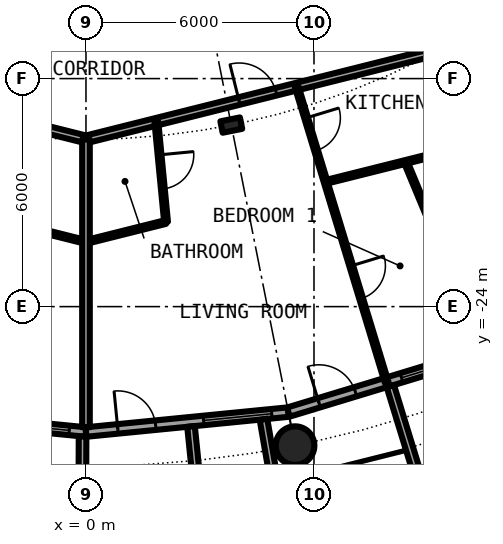
"""IFC4 building model, lengths in metres.
Left out: names, types, materials, properties, quantities, classifications, styles, units other than length and angle.
Written with IfcOpenShell. Run it as: python <this file> out.ifc"""

import sys

from ifc_helpers import new_model, si_unit, direction, frame, frame_2d, origin, origin_2d, place, context, subcontext, project, spatial, rectangle, circle, hollow_circle, i_section, extrude, element, fill, save


model = new_model("IFC4")
c1 = context("Model", 3, precision=1e-05, world=origin(), true_north=direction((0.0, 1.0)))
c2 = subcontext(c1, "Body", "Model", "MODEL_VIEW")
j1 = project(units=[si_unit("LENGTHUNIT", "METRE"), si_unit("PLANEANGLEUNIT", "RADIAN")], contexts=[c1])
p1 = place(None, origin())
s1 = spatial("IfcSite", under=j1, at=p1, CompositionType="ELEMENT")
p2 = place(p1, origin())
s2 = spatial("IfcBuilding", under=s1, at=p2, CompositionType="ELEMENT")
p3 = place(p2, frame((0.0, 0.0, 81.9)))
s3 = spatial("IfcBuildingStorey", under=s2, at=p3, CompositionType="ELEMENT", Elevation=81.9)
p4 = place(p3, frame((5.501, -27.658, 0.0), z_axis=(0.0, 0.0, 1.0), x_axis=(1.0, 0.0, 0.0)))
e1 = element("IfcColumn", 1, at=p4, inside=s3, PredefinedType="COLUMN", context=c2, shape_type="SweptSolid", body=[
    extrude(hollow_circle(Radius=0.508, WallThickness=0.04, at=origin_2d()), origin(), (0.0, 0.0, 1.0), 3.05),
])
p5 = place(p3, frame((3.824, -19.223, 0.0), z_axis=(0.0, 0.0, 1.0), x_axis=(0.195090322016, -0.980785280403, 0.0)))
e2 = element("IfcColumn", 2, at=p5, inside=s3, PredefinedType="COLUMN", context=c2, shape_type="SweptSolid", body=[
    extrude(i_section(OverallWidth=0.306, OverallDepth=0.524, WebThickness=0.021, FlangeThickness=0.04, FilletRadius=0.027, at=origin_2d()), origin(), (0.0, 0.0, 1.0), 3.05),
])
p6 = place(p3, frame((-5.326, -26.775, 0.0), z_axis=(0.0, 0.0, 1.0), x_axis=(0.995173996315, -0.098126026407, 0.0)))
e3 = element("IfcWall", 3, at=p6, inside=s3, PredefinedType="SOLIDWALL", context=c2, shape_type="SweptSolid", body=[
    extrude(rectangle(XDim=5.352, YDim=0.25, at=frame_2d((2.676, 0.0))), origin(), (0.0, 0.0, 1.0), 2.7),
])
p7 = place(p6, frame((0.841, 0.0, 0.0)))
e4 = element("IfcOpeningElement", 4, at=p7, cuts=e3, PredefinedType="OPENING", context=c2, shape_type="SweptSolid", body=[
    extrude(rectangle(XDim=1.0, YDim=2.2, at=frame_2d((0.5, 1.1))), frame((0.0, 0.135, 0.0), z_axis=(0.0, -1.0, 0.0), x_axis=(1.0, 0.0, 0.0)), (0.0, 0.0, 1.0), 0.27),
])
p8 = place(p6, frame((3.111, 0.0, 0.3)))
e5 = element("IfcOpeningElement", 5, at=p8, cuts=e3, PredefinedType="OPENING", context=c2, shape_type="SweptSolid", body=[
    extrude(rectangle(XDim=1.8, YDim=2.1, at=frame_2d((0.9, 1.05))), frame((0.0, 0.135, 0.0), z_axis=(0.0, -1.0, 0.0), x_axis=(1.0, 0.0, 0.0)), (0.0, 0.0, 1.0), 0.27),
])
p9 = place(p3, frame((-0.09, -27.417, -0.03), z_axis=(0.0, 0.0, 1.0), x_axis=(-0.00347308367, -0.999993968827, 0.0)))
e6 = element("IfcWall", 6, at=p9, inside=s3, PredefinedType="SOLIDWALL", context=c2, shape_type="SweptSolid", body=[
    extrude(rectangle(XDim=2.882, YDim=0.2, at=frame_2d((1.441, 0.0))), origin(), (0.0, 0.0, 1.0), 2.73),
])
p10 = place(p3, frame((0.0, -27.3, 0.0), z_axis=(0.0, 0.0, 1.0), x_axis=(0.995173996315, 0.098126026407, 0.0)))
e7 = element("IfcWall", 7, at=p10, inside=s3, PredefinedType="SOLIDWALL", context=c2, shape_type="SweptSolid", body=[
    extrude(rectangle(XDim=5.352, YDim=0.25, at=frame_2d((2.676, 0.0))), origin(), (0.0, 0.0, 1.0), 2.7),
])
p11 = place(p10, frame((0.841, 0.0, 0.0)))
e8 = element("IfcOpeningElement", 8, at=p11, cuts=e7, PredefinedType="OPENING", context=c2, shape_type="SweptSolid", body=[
    extrude(rectangle(XDim=1.0, YDim=2.2, at=frame_2d((0.5, 1.1))), frame((0.0, 0.135, 0.0), z_axis=(0.0, -1.0, 0.0), x_axis=(1.0, 0.0, 0.0)), (0.0, 0.0, 1.0), 0.27),
])
p12 = place(p10, frame((3.111, 0.0, 0.3)))
e9 = element("IfcOpeningElement", 9, at=p12, cuts=e7, PredefinedType="OPENING", context=c2, shape_type="SweptSolid", body=[
    extrude(rectangle(XDim=1.8, YDim=2.1, at=frame_2d((0.9, 1.05))), frame((0.0, 0.135, 0.0), z_axis=(0.0, -1.0, 0.0), x_axis=(1.0, 0.0, 0.0)), (0.0, 0.0, 1.0), 0.27),
])
p13 = place(p3, frame((2.764, -27.153, -0.03), z_axis=(0.0, 0.0, 1.0), x_axis=(0.101505487237, -0.994834979311, 0.0)))
e10 = element("IfcWall", 10, at=p13, inside=s3, PredefinedType="SOLIDWALL", context=c2, shape_type="SweptSolid", body=[
    extrude(rectangle(XDim=3.007, YDim=0.2, at=frame_2d((1.503, 0.0))), origin(), (0.0, 0.0, 1.0), 2.73),
])
p14 = place(p3, frame((4.671, -26.966, -0.03), z_axis=(0.0, 0.0, 1.0), x_axis=(0.170539878907, -0.985350774954, 0.0)))
e11 = element("IfcWall", 11, at=p14, inside=s3, PredefinedType="SOLIDWALL", context=c2, shape_type="SweptSolid", body=[
    extrude(rectangle(XDim=2.932, YDim=0.2, at=frame_2d((1.466, 0.0))), origin(), (0.0, 0.0, 1.0), 2.73),
])
p15 = place(p3, frame((5.326, -26.775, 0.0), z_axis=(0.0, 0.0, 1.0), x_axis=(0.956965678721, 0.290201119486, 0.0)))
e12 = element("IfcWall", 12, at=p15, inside=s3, PredefinedType="SOLIDWALL", context=c2, shape_type="SweptSolid", body=[
    extrude(rectangle(XDim=5.351, YDim=0.25, at=frame_2d((2.676, 0.0))), origin(), (0.0, 0.0, 1.0), 2.7),
])
p16 = place(p15, frame((0.841, 0.0, 0.0)))
e13 = element("IfcOpeningElement", 13, at=p16, cuts=e12, PredefinedType="OPENING", context=c2, shape_type="SweptSolid", body=[
    extrude(rectangle(XDim=1.0, YDim=2.2, at=frame_2d((0.5, 1.1))), frame((0.0, 0.135, 0.0), z_axis=(0.0, -1.0, 0.0), x_axis=(1.0, 0.0, 0.0)), (0.0, 0.0, 1.0), 0.27),
])
p17 = place(p15, frame((3.111, 0.0, 0.3)))
e14 = element("IfcOpeningElement", 14, at=p17, cuts=e12, PredefinedType="OPENING", context=c2, shape_type="SweptSolid", body=[
    extrude(rectangle(XDim=1.8, YDim=2.1, at=frame_2d((0.9, 1.05))), frame((0.0, 0.135, 0.0), z_axis=(0.0, -1.0, 0.0), x_axis=(1.0, 0.0, 0.0)), (0.0, 0.0, 1.0), 0.27),
])
p18 = place(p3, frame((8.82, -29.093, -0.03), z_axis=(0.0, 0.0, 1.0), x_axis=(0.941461077774, 0.337121697664, 0.0)))
e15 = element("IfcWall", 15, at=p18, inside=s3, PredefinedType="SOLIDWALL", context=c2, shape_type="SweptSolid", body=[
    extrude(rectangle(XDim=2.993, YDim=0.2, at=frame_2d((1.497, 0.0))), origin(), (0.0, 0.0, 1.0), 2.73),
])
p19 = place(p18, frame((0.457, 0.0, 0.33)))
e16 = element("IfcOpeningElement", 16, at=p19, cuts=e15, PredefinedType="OPENING", context=c2, shape_type="SweptSolid", body=[
    extrude(circle(Radius=1.04, at=frame_2d((1.04, 1.04))), frame((0.0, 0.11, 0.0), z_axis=(0.0, -1.0, 0.0), x_axis=(1.0, 0.0, 0.0)), (0.0, 0.0, 1.0), 0.22),
])
p20 = place(p3, frame((8.009, -26.092, -0.03), z_axis=(0.0, 0.0, 1.0), x_axis=(0.293406695073, -0.955987715029, 0.0)))
e17 = element("IfcWall", 17, at=p20, inside=s3, PredefinedType="SOLIDWALL", context=c2, shape_type="SweptSolid", body=[
    extrude(rectangle(XDim=3.006, YDim=0.2, at=frame_2d((1.503, 0.0))), origin(), (0.0, 0.0, 1.0), 2.73),
])
for number, where, z_axis, x_axis in (
    (18, (-2.096, -21.774, 0.0), (0.0, 0.0, 1.0), (0.97, -0.243, 0.0)),
    (19, (-0.006, -22.301, 0.0), (0.0, 0.0, 1.0), (0.97, 0.243, 0.0)),
):
    element("IfcWall", number, at=place(p3, frame(where, z_axis=z_axis, x_axis=x_axis)), inside=s3, PredefinedType="PARTITIONING", context=c2, shape_type="SweptSolid", body=[
        extrude(rectangle(XDim=2.167, YDim=0.1, at=frame_2d((1.083, 0.0))), origin(), (0.0, 0.0, 1.0), 2.7),
    ])
p21 = place(p3, frame((6.303, -20.721, 0.0), z_axis=(0.0, 0.0, 1.0), x_axis=(0.97005315629, 0.242892721118, 0.0)))
e20 = element("IfcWall", 20, at=p21, inside=s3, PredefinedType="PARTITIONING", context=c2, shape_type="SweptSolid", body=[
    extrude(rectangle(XDim=4.343, YDim=0.1, at=frame_2d((2.172, 0.0))), origin(), (0.0, 0.0, 1.0), 2.7),
])
p22 = place(p3, frame((-9.242, -17.284, 0.0), z_axis=(0.0, 0.0, 1.0), x_axis=(0.970002158938, -0.243096301198, 0.0)))
e21 = element("IfcWall", 21, at=p22, inside=s3, PredefinedType="PARTITIONING", context=c2, shape_type="SweptSolid", body=[
    extrude(rectangle(XDim=9.528, YDim=0.2, at=frame_2d((4.764, 0.0))), origin(), (0.0, 0.0, 1.0), 2.38),
])
p23 = place(p22, frame((6.062, 0.0, 0.0)))
e22 = element("IfcOpeningElement", 22, at=p23, cuts=e21, PredefinedType="OPENING", context=c2, shape_type="SweptSolid", body=[
    extrude(rectangle(XDim=1.0, YDim=2.3, at=frame_2d((0.5, 1.15))), frame((0.0, 0.11, 0.0), z_axis=(0.0, -1.0, 0.0), x_axis=(1.0, 0.0, 0.0)), (0.0, 0.0, 1.0), 0.22),
])
p24 = place(p3, frame((0.0, -19.6, 0.0), z_axis=(0.0, 0.0, 1.0), x_axis=(0.970002158938, 0.243096301198, 0.0)))
e23 = element("IfcWall", 23, at=p24, inside=s3, PredefinedType="PARTITIONING", context=c2, shape_type="SweptSolid", body=[
    extrude(rectangle(XDim=9.528, YDim=0.2, at=frame_2d((4.764, 0.0))), origin(), (0.0, 0.0, 1.0), 2.38),
])
p25 = place(p24, frame((4.155, 0.0, 0.0)))
e24 = element("IfcOpeningElement", 24, at=p25, cuts=e23, PredefinedType="OPENING", context=c2, shape_type="SweptSolid", body=[
    extrude(rectangle(XDim=1.0, YDim=2.3, at=frame_2d((0.5, 1.15))), frame((0.0, 0.11, 0.0), z_axis=(0.0, -1.0, 0.0), x_axis=(1.0, 0.0, 0.0)), (0.0, 0.0, 1.0), 0.22),
])
p26 = place(p3, frame((0.0, -27.175, 0.0), z_axis=(0.0, 0.0, 1.0), x_axis=(0.0, 1.0, 0.0)))
e25 = element("IfcWall", 25, at=p26, inside=s3, PredefinedType="PARTITIONING", context=c2, shape_type="SweptSolid", body=[
    extrude(rectangle(XDim=7.575, YDim=0.2, at=frame_2d((3.788, 0.0))), origin(), (0.0, 0.0, 1.0), 2.7),
])
p27 = place(p3, frame((1.852, -19.137, 0.0), z_axis=(0.0, 0.0, 1.0), x_axis=(0.09627998515, -0.995354290923, 0.0)))
e26 = element("IfcWall", 26, at=p27, inside=s3, PredefinedType="PARTITIONING", context=c2, shape_type="SweptSolid", body=[
    extrude(rectangle(XDim=2.647, YDim=0.1, at=frame_2d((1.324, 0.0))), origin(), (0.0, 0.0, 1.0), 2.7),
])
p28 = place(p27, frame((0.874, 0.0, 0.0)))
e27 = element("IfcOpeningElement", 27, at=p28, cuts=e26, PredefinedType="OPENING", context=c2, shape_type="SweptSolid", body=[
    extrude(rectangle(XDim=0.9, YDim=2.3, at=frame_2d((0.45, 1.15))), frame((0.0, 0.06, 0.0), z_axis=(0.0, -1.0, 0.0), x_axis=(1.0, 0.0, 0.0)), (0.0, 0.0, 1.0), 0.12),
])
p29 = place(p3, frame((5.543, -18.211, 0.0), z_axis=(0.0, 0.0, 1.0), x_axis=(0.291319167605, -0.956625915698, 0.0)))
e28 = element("IfcWall", 28, at=p29, inside=s3, PredefinedType="PARTITIONING", context=c2, shape_type="SweptSolid", body=[
    extrude(rectangle(XDim=8.139, YDim=0.1, at=frame_2d((4.07, 0.0))), origin(), (0.0, 0.0, 1.0), 2.7),
])
p30 = place(p29, frame((0.862, 0.0, 0.0)))
e29 = element("IfcOpeningElement", 29, at=p30, cuts=e28, PredefinedType="OPENING", context=c2, shape_type="SweptSolid", body=[
    extrude(rectangle(XDim=0.9, YDim=2.3, at=frame_2d((0.45, 1.15))), frame((0.0, 0.06, 0.0), z_axis=(0.0, -1.0, 0.0), x_axis=(1.0, 0.0, 0.0)), (0.0, 0.0, 1.0), 0.12),
])
p31 = place(p29, frame((4.931, 0.0, 0.0)))
e30 = element("IfcOpeningElement", 30, at=p31, cuts=e28, PredefinedType="OPENING", context=c2, shape_type="SweptSolid", body=[
    extrude(rectangle(XDim=0.9, YDim=2.3, at=frame_2d((0.45, 1.15))), frame((0.0, 0.06, 0.0), z_axis=(0.0, -1.0, 0.0), x_axis=(1.0, 0.0, 0.0)), (0.0, 0.0, 1.0), 0.12),
])
p32 = place(p3, frame((8.412, -20.192, 0.0), z_axis=(0.0, 0.0, 1.0), x_axis=(0.384464934183, -0.923139596369, 0.0)))
e31 = element("IfcWall", 31, at=p32, inside=s3, PredefinedType="PARTITIONING", context=c2, shape_type="SweptSolid", body=[
    extrude(rectangle(XDim=5.301, YDim=0.1, at=frame_2d((2.65, 0.0))), origin(), (0.0, 0.0, 1.0), 2.7),
])
p33 = place(p32, frame((2.2, 0.0, 0.0)))
e32 = element("IfcOpeningElement", 32, at=p33, cuts=e31, PredefinedType="OPENING", context=c2, shape_type="SweptSolid", body=[
    extrude(rectangle(XDim=0.9, YDim=2.3, at=frame_2d((0.45, 1.15))), frame((0.0, 0.06, 0.0), z_axis=(0.0, -1.0, 0.0), x_axis=(1.0, 0.0, 0.0)), (0.0, 0.0, 1.0), 0.12),
])
p34 = place(p8, origin())
e33 = element("IfcWindow", 33, at=p34, inside=s3, PartitioningType="SINGLE_PANEL", PredefinedType="WINDOW", context=c2, shape_type="SweptSolid", body=[
    extrude(rectangle(XDim=1.8, YDim=2.1, at=frame_2d((0.9, 1.05))), frame((0.0, 0.03, 0.0), z_axis=(0.0, -1.0, 0.0), x_axis=(1.0, 0.0, 0.0)), (0.0, 0.0, 1.0), 0.06),
])
fill(e5, e33)
p35 = place(p11, origin())
e34 = element("IfcDoor", 34, at=p35, inside=s3, OperationType="SINGLE_SWING_LEFT", PredefinedType="DOOR", context=c2, shape_type="SweptSolid", body=[
    extrude(rectangle(XDim=1.0, YDim=2.2, at=frame_2d((0.5, 1.1))), frame((0.0, 0.025, 0.0), z_axis=(0.0, -1.0, 0.0), x_axis=(1.0, 0.0, 0.0)), (0.0, 0.0, 1.0), 0.05),
])
fill(e8, e34)
p36 = place(p12, origin())
e35 = element("IfcWindow", 35, at=p36, inside=s3, PartitioningType="SINGLE_PANEL", PredefinedType="WINDOW", context=c2, shape_type="SweptSolid", body=[
    extrude(rectangle(XDim=1.8, YDim=2.1, at=frame_2d((0.9, 1.05))), frame((0.0, 0.03, 0.0), z_axis=(0.0, -1.0, 0.0), x_axis=(1.0, 0.0, 0.0)), (0.0, 0.0, 1.0), 0.06),
])
fill(e9, e35)
p37 = place(p16, origin())
e36 = element("IfcDoor", 36, at=p37, inside=s3, OperationType="SINGLE_SWING_LEFT", PredefinedType="DOOR", context=c2, shape_type="SweptSolid", body=[
    extrude(rectangle(XDim=1.0, YDim=2.2, at=frame_2d((0.5, 1.1))), frame((0.0, 0.025, 0.0), z_axis=(0.0, -1.0, 0.0), x_axis=(1.0, 0.0, 0.0)), (0.0, 0.0, 1.0), 0.05),
])
fill(e13, e36)
p38 = place(p17, origin())
e37 = element("IfcWindow", 37, at=p38, inside=s3, PartitioningType="SINGLE_PANEL", PredefinedType="WINDOW", context=c2, shape_type="SweptSolid", body=[
    extrude(rectangle(XDim=1.8, YDim=2.1, at=frame_2d((0.9, 1.05))), frame((0.0, 0.03, 0.0), z_axis=(0.0, -1.0, 0.0), x_axis=(1.0, 0.0, 0.0)), (0.0, 0.0, 1.0), 0.06),
])
fill(e14, e37)
p39 = place(p25, origin())
e38 = element("IfcDoor", 38, at=p39, inside=s3, OperationType="SINGLE_SWING_LEFT", PredefinedType="DOOR", context=c2, shape_type="SweptSolid", body=[
    extrude(rectangle(XDim=1.0, YDim=2.3, at=frame_2d((0.5, 1.15))), frame((0.0, 0.025, 0.0), z_axis=(0.0, -1.0, 0.0), x_axis=(1.0, 0.0, 0.0)), (0.0, 0.0, 1.0), 0.05),
])
fill(e24, e38)
p40 = place(p28, origin())
e39 = element("IfcDoor", 39, at=p40, inside=s3, OperationType="SINGLE_SWING_RIGHT", PredefinedType="DOOR", context=c2, shape_type="SweptSolid", body=[
    extrude(rectangle(XDim=0.9, YDim=2.3, at=frame_2d((0.45, 1.15))), frame((0.0, 0.025, 0.0), z_axis=(0.0, -1.0, 0.0), x_axis=(1.0, 0.0, 0.0)), (0.0, 0.0, 1.0), 0.05),
])
fill(e27, e39)
p41 = place(p30, origin())
e40 = element("IfcDoor", 40, at=p41, inside=s3, OperationType="SINGLE_SWING_LEFT", PredefinedType="DOOR", context=c2, shape_type="SweptSolid", body=[
    extrude(rectangle(XDim=0.9, YDim=2.3, at=frame_2d((0.45, 1.15))), frame((0.0, 0.025, 0.0), z_axis=(0.0, -1.0, 0.0), x_axis=(1.0, 0.0, 0.0)), (0.0, 0.0, 1.0), 0.05),
])
fill(e29, e40)
p42 = place(p31, origin())
e41 = element("IfcDoor", 41, at=p42, inside=s3, OperationType="SINGLE_SWING_RIGHT", PredefinedType="DOOR", context=c2, shape_type="SweptSolid", body=[
    extrude(rectangle(XDim=0.9, YDim=2.3, at=frame_2d((0.45, 1.15))), frame((0.0, 0.025, 0.0), z_axis=(0.0, -1.0, 0.0), x_axis=(1.0, 0.0, 0.0)), (0.0, 0.0, 1.0), 0.05),
])
fill(e30, e41)
save(model, sys.argv[1])
